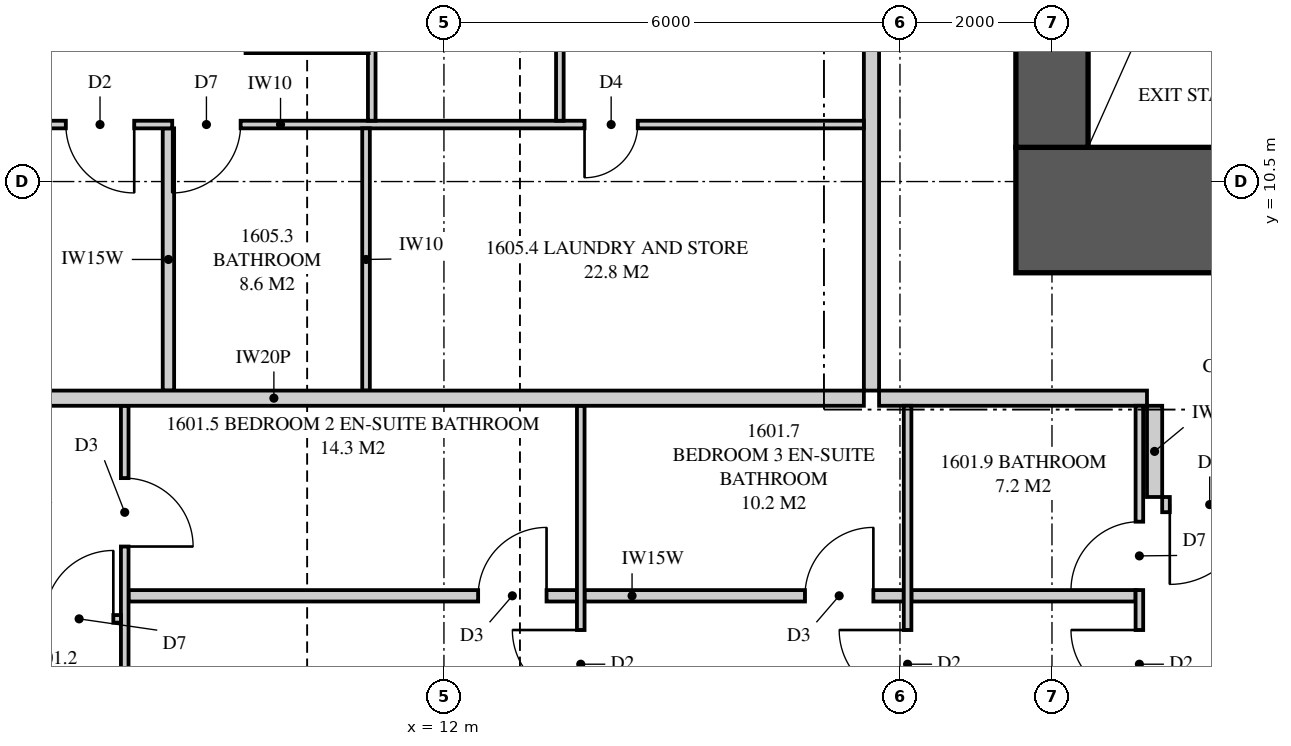
"""IFC4 building model, lengths in metres.
Left out: names, types, materials, properties, quantities, classifications, styles, units other than length and angle.
Written with IfcOpenShell. Run it as: python <this file> out.ifc"""

import sys

from ifc_helpers import new_model, si_unit, direction, frame, frame_2d, origin, place, context, subcontext, project, spatial, polyline, rectangle, outline, extrude, element, fill, save


model = new_model("IFC4")
c1 = context("Model", 3, precision=1e-05, world=origin(), true_north=direction((0.0, 1.0)))
c2 = subcontext(c1, "Body", "Model", "MODEL_VIEW")
j1 = project(units=[si_unit("LENGTHUNIT", "METRE"), si_unit("PLANEANGLEUNIT", "RADIAN")], contexts=[c1])
p1 = place(None, origin())
s1 = spatial("IfcSite", under=j1, at=p1, CompositionType="ELEMENT")
p2 = place(p1, origin())
s2 = spatial("IfcBuilding", under=s1, at=p2, CompositionType="ELEMENT")
p3 = place(p2, frame((0.0, 0.0, 61.2)))
s3 = spatial("IfcBuildingStorey", under=s2, at=p3, CompositionType="ELEMENT", Elevation=61.2)
p4 = place(p3, frame((19.525, 10.125, 0.0), z_axis=(0.0, 0.0, 1.0), x_axis=(1.0, 0.0, 0.0)))
e1 = element("IfcWall", 1, at=p4, inside=s3, PredefinedType="SHEAR", context=c2, shape_type="SweptSolid", body=[
    extrude(rectangle(XDim=6.475, YDim=1.65, at=frame_2d((3.238, 0.0))), origin(), (0.0, 0.0, 1.0), 3.35),
])
p5 = place(p4, frame((4.9, 0.0, 0.0)))
e2 = element("IfcOpeningElement", 2, at=p5, cuts=e1, PredefinedType="OPENING", context=c2, shape_type="SweptSolid", body=[
    extrude(rectangle(XDim=0.75, YDim=2.1, at=frame_2d((0.375, 1.05))), frame((0.0, 0.835, 0.0), z_axis=(0.0, -1.0, 0.0), x_axis=(1.0, 0.0, 0.0)), (0.0, 0.0, 1.0), 1.67),
])
p6 = place(p3, frame((20.0, 13.0, 0.0), z_axis=(0.0, 0.0, 1.0), x_axis=(0.0, -1.0, 0.0)))
e3 = element("IfcWall", 3, at=p6, inside=s3, PredefinedType="SHEAR", context=c2, shape_type="SweptSolid", body=[
    extrude(rectangle(XDim=2.05, YDim=0.95, at=frame_2d((1.025, 0.0))), origin(), (0.0, 0.0, 1.0), 3.35),
])
p7 = place(p3, frame((17.725, 7.65, 0.0), z_axis=(0.0, 0.0, 1.0), x_axis=(1.0, 0.0, 0.0)))
e4 = element("IfcWall", 4, at=p7, inside=s3, PredefinedType="PARTITIONING", context=c2, shape_type="SweptSolid", body=[
    extrude(rectangle(XDim=3.525, YDim=0.2, at=frame_2d((1.762, 0.0))), origin(), (0.0, 0.0, 1.0), 3.11),
])
p8 = place(p3, frame((7.8, 0.175, 0.0), z_axis=(0.0, 0.0, 1.0), x_axis=(0.0, 1.0, 0.0)))
e5 = element("IfcWall", 5, at=p8, inside=s3, PredefinedType="PARTITIONING", context=c2, shape_type="SweptSolid", body=[
    extrude(outline(polyline([(0.0, 0.0), (7.375, 0.0), (7.375, 3.11), (2.697, 3.11), (2.697, 2.15), (0.943, 2.15), (0.943, 3.11), (0.0, 3.11), (0.0, 0.0)])), frame((0.0, 0.05, 0.0), z_axis=(0.0, -1.0, 0.0), x_axis=(1.0, 0.0, 0.0)), (0.0, 0.0, 1.0), 0.1),
])
p9 = place(p8, frame((2.772, 0.0, 0.0)))
e6 = element("IfcOpeningElement", 6, at=p9, cuts=e5, PredefinedType="OPENING", context=c2, shape_type="SweptSolid", body=[
    extrude(rectangle(XDim=0.9, YDim=2.1, at=frame_2d((0.45, 1.05))), frame((0.0, 0.06, 0.0), z_axis=(0.0, -1.0, 0.0), x_axis=(1.0, 0.0, 0.0)), (0.0, 0.0, 1.0), 0.12),
])
p10 = place(p8, frame((5.523, 0.0, 0.0)))
e7 = element("IfcOpeningElement", 7, at=p10, cuts=e5, PredefinedType="OPENING", context=c2, shape_type="SweptSolid", body=[
    extrude(rectangle(XDim=0.9, YDim=2.1, at=frame_2d((0.45, 1.05))), frame((0.0, 0.06, 0.0), z_axis=(0.0, -1.0, 0.0), x_axis=(1.0, 0.0, 0.0)), (0.0, 0.0, 1.0), 0.12),
])
p11 = place(p3, frame((13.8, 0.175, 0.0), z_axis=(0.0, 0.0, 1.0), x_axis=(0.0, 1.0, 0.0)))
e8 = element("IfcWall", 8, at=p11, inside=s3, PredefinedType="PARTITIONING", context=c2, shape_type="SweptSolid", body=[
    extrude(outline(polyline([(1.635, 2.15), (0.0, 2.15), (0.0, 0.0), (7.375, 0.0), (7.375, 3.11), (1.635, 3.11), (1.635, 2.15)]), holes=[polyline([(1.021, 0.133), (0.529, 0.133), (0.529, 0.923), (1.021, 0.923), (1.021, 0.133)]), polyline([(1.021, 1.227), (0.529, 1.227), (0.529, 2.017), (1.021, 2.017), (1.021, 1.227)])]), frame((0.0, 0.05, 0.0), z_axis=(0.0, -1.0, 0.0), x_axis=(1.0, 0.0, 0.0)), (0.0, 0.0, 1.0), 0.1),
])
p12 = place(p11, frame((3.525, 0.0, 0.0)))
e9 = element("IfcOpeningElement", 9, at=p12, cuts=e8, PredefinedType="OPENING", context=c2, shape_type="SweptSolid", body=[
    extrude(rectangle(XDim=0.9, YDim=2.1, at=frame_2d((0.45, 1.05))), frame((0.0, 0.06, 0.0), z_axis=(0.0, -1.0, 0.0), x_axis=(1.0, 0.0, 0.0)), (0.0, 0.0, 1.0), 0.12),
])
p13 = place(p3, frame((18.1, 0.175, 0.0), z_axis=(0.0, 0.0, 1.0), x_axis=(0.0, 1.0, 0.0)))
e10 = element("IfcWall", 10, at=p13, inside=s3, PredefinedType="PARTITIONING", context=c2, shape_type="SweptSolid", body=[
    extrude(outline(polyline([(0.0, 0.0), (7.375, 0.0), (7.375, 3.11), (1.635, 3.11), (1.635, 2.15), (0.0, 2.15), (0.0, 3.11), (0.0, 0.0)])), frame((0.0, 0.05, 0.0), z_axis=(0.0, -1.0, 0.0), x_axis=(1.0, 0.0, 0.0)), (0.0, 0.0, 1.0), 0.1),
])
p14 = place(p13, frame((3.525, 0.0, 0.0)))
e11 = element("IfcOpeningElement", 11, at=p14, cuts=e10, PredefinedType="OPENING", context=c2, shape_type="SweptSolid", body=[
    extrude(rectangle(XDim=0.9, YDim=2.1, at=frame_2d((0.45, 1.05))), frame((0.0, 0.06, 0.0), z_axis=(0.0, -1.0, 0.0), x_axis=(1.0, 0.0, 0.0)), (0.0, 0.0, 1.0), 0.12),
])
p15 = place(p3, frame((21.15, 0.175, 0.0), z_axis=(0.0, 0.0, 1.0), x_axis=(0.0, 1.0, 0.0)))
e12 = element("IfcWall", 12, at=p15, inside=s3, PredefinedType="PARTITIONING", context=c2, shape_type="SweptSolid", body=[
    extrude(outline(polyline([(0.0, 0.0), (7.375, 0.0), (7.375, 3.11), (1.635, 3.11), (1.635, 2.15), (0.0, 2.15), (0.0, 3.11), (0.0, 0.0)])), frame((0.0, 0.05, 0.0), z_axis=(0.0, -1.0, 0.0), x_axis=(1.0, 0.0, 0.0)), (0.0, 0.0, 1.0), 0.1),
])
p16 = place(p15, frame((3.525, 0.0, 0.0)))
e13 = element("IfcOpeningElement", 13, at=p16, cuts=e12, PredefinedType="OPENING", context=c2, shape_type="SweptSolid", body=[
    extrude(rectangle(XDim=0.9, YDim=2.1, at=frame_2d((0.45, 1.05))), frame((0.0, 0.06, 0.0), z_axis=(0.0, -1.0, 0.0), x_axis=(1.0, 0.0, 0.0)), (0.0, 0.0, 1.0), 0.12),
])
p17 = place(p15, frame((4.95, 0.0, 0.0)))
e14 = element("IfcOpeningElement", 14, at=p17, cuts=e12, PredefinedType="OPENING", context=c2, shape_type="SweptSolid", body=[
    extrude(rectangle(XDim=0.9, YDim=2.1, at=frame_2d((0.45, 1.05))), frame((0.0, 0.06, 0.0), z_axis=(0.0, -1.0, 0.0), x_axis=(1.0, 0.0, 0.0)), (0.0, 0.0, 1.0), 0.12),
])
p18 = place(p3, frame((2.0, 4.747, 0.0), z_axis=(0.0, 0.0, 1.0), x_axis=(1.0, 0.0, 0.0)))
e15 = element("IfcWall", 15, at=p18, inside=s3, PredefinedType="PARTITIONING", context=c2, shape_type="SweptSolid", body=[
    extrude(outline(polyline([(0.0, 0.0), (5.75, 0.0), (5.75, 3.11), (3.16, 3.11), (3.16, 2.15), (1.417, 2.15), (1.417, 3.11), (0.0, 3.11), (0.0, 0.0)])), frame((0.0, 0.05, 0.0), z_axis=(0.0, -1.0, 0.0), x_axis=(1.0, 0.0, 0.0)), (0.0, 0.0, 1.0), 0.1),
])
p19 = place(p18, frame((4.75, 0.0, 0.0)))
e16 = element("IfcOpeningElement", 16, at=p19, cuts=e15, PredefinedType="OPENING", context=c2, shape_type="SweptSolid", body=[
    extrude(rectangle(XDim=0.9, YDim=2.1, at=frame_2d((0.45, 1.05))), frame((0.0, 0.06, 0.0), z_axis=(0.0, -1.0, 0.0), x_axis=(1.0, 0.0, 0.0)), (0.0, 0.0, 1.0), 0.12),
])
p20 = place(p3, frame((7.85, 5.05, 0.0), z_axis=(0.0, 0.0, 1.0), x_axis=(1.0, 0.0, 0.0)))
e17 = element("IfcWall", 17, at=p20, inside=s3, PredefinedType="PLUMBINGWALL", context=c2, shape_type="SweptSolid", body=[
    extrude(outline(polyline([(0.0, 0.0), (5.9, 0.0), (5.9, 3.11), (5.462, 3.11), (5.462, 2.541), (4.838, 2.541), (4.838, 3.11), (3.635, 3.11), (3.635, 2.51), (1.065, 2.51), (1.065, 3.11), (0.0, 3.11), (0.0, 0.0)])), frame((0.0, 0.075, 0.0), z_axis=(0.0, -1.0, 0.0), x_axis=(1.0, 0.0, 0.0)), (0.0, 0.0, 1.0), 0.15),
])
p21 = place(p20, frame((4.6, 0.0, 0.0)))
e18 = element("IfcOpeningElement", 18, at=p21, cuts=e17, PredefinedType="OPENING", context=c2, shape_type="SweptSolid", body=[
    extrude(rectangle(XDim=0.9, YDim=2.1, at=frame_2d((0.45, 1.05))), frame((0.0, 0.085, 0.0), z_axis=(0.0, -1.0, 0.0), x_axis=(1.0, 0.0, 0.0)), (0.0, 0.0, 1.0), 0.17),
])
p22 = place(p3, frame((13.85, 5.05, 0.0), z_axis=(0.0, 0.0, 1.0), x_axis=(1.0, 0.0, 0.0)))
e19 = element("IfcWall", 19, at=p22, inside=s3, PredefinedType="PLUMBINGWALL", context=c2, shape_type="SweptSolid", body=[
    extrude(rectangle(XDim=4.2, YDim=0.15, at=frame_2d((2.1, 0.0))), origin(), (0.0, 0.0, 1.0), 3.11),
])
p23 = place(p22, frame((2.9, 0.0, 0.0)))
e20 = element("IfcOpeningElement", 20, at=p23, cuts=e19, PredefinedType="OPENING", context=c2, shape_type="SweptSolid", body=[
    extrude(rectangle(XDim=0.9, YDim=2.1, at=frame_2d((0.45, 1.05))), frame((0.0, 0.085, 0.0), z_axis=(0.0, -1.0, 0.0), x_axis=(1.0, 0.0, 0.0)), (0.0, 0.0, 1.0), 0.17),
])
p24 = place(p3, frame((18.15, 5.05, 0.0), z_axis=(0.0, 0.0, 1.0), x_axis=(1.0, 0.0, 0.0)))
e21 = element("IfcWall", 21, at=p24, inside=s3, PredefinedType="PLUMBINGWALL", context=c2, shape_type="SweptSolid", body=[
    extrude(rectangle(XDim=2.95, YDim=0.15, at=frame_2d((1.475, 0.0))), origin(), (0.0, 0.0, 1.0), 3.11),
])
p25 = place(p3, frame((2.0, 7.65, 0.0), z_axis=(0.0, 0.0, 1.0), x_axis=(1.0, 0.0, 0.0)))
e22 = element("IfcWall", 22, at=p25, inside=s3, PredefinedType="PARTITIONING", context=c2, shape_type="SweptSolid", body=[
    extrude(outline(polyline([(0.0, 0.0), (15.525, 0.0), (15.525, 3.11), (11.337, 3.11), (11.337, 2.541), (10.663, 2.541), (10.663, 3.11), (9.51, 3.11), (9.51, 2.51), (6.89, 2.51), (6.89, 3.11), (2.969, 3.11), (2.969, 2.541), (2.74, 2.541), (2.74, 2.15), (0.896, 2.15), (0.896, 3.11), (0.0, 3.11), (0.0, 0.0)])), frame((0.0, 0.1, 0.0), z_axis=(0.0, -1.0, 0.0), x_axis=(1.0, 0.0, 0.0)), (0.0, 0.0, 1.0), 0.2),
])
p26 = place(p3, frame((17.625, 7.75, 0.0), z_axis=(0.0, 0.0, 1.0), x_axis=(0.0, 1.0, 0.0)))
e23 = element("IfcWall", 23, at=p26, inside=s3, PredefinedType="PARTITIONING", context=c2, shape_type="SweptSolid", body=[
    extrude(outline(polyline([(0.0, 0.0), (16.25, 0.0), (16.25, 3.11), (5.587, 3.11), (5.587, 2.541), (4.913, 2.541), (4.913, 3.11), (0.0, 3.11), (0.0, 0.0)])), frame((0.0, 0.1, 0.0), z_axis=(0.0, -1.0, 0.0), x_axis=(1.0, 0.0, 0.0)), (0.0, 0.0, 1.0), 0.2),
])
p27 = place(p26, frame((7.075, 0.0, 0.0)))
e24 = element("IfcOpeningElement", 24, at=p27, cuts=e23, PredefinedType="OPENING", context=c2, shape_type="SweptSolid", body=[
    extrude(rectangle(XDim=1.05, YDim=2.2, at=frame_2d((0.525, 1.1))), frame((0.0, 0.11, 0.0), z_axis=(0.0, -1.0, 0.0), x_axis=(1.0, 0.0, 0.0)), (0.0, 0.0, 1.0), 0.22),
])
p28 = place(p3, frame((2.175, 11.25, 0.0), z_axis=(0.0, 0.0, 1.0), x_axis=(1.0, 0.0, 0.0)))
e25 = element("IfcWall", 25, at=p28, inside=s3, PredefinedType="PARTITIONING", context=c2, shape_type="SweptSolid", body=[
    extrude(outline(polyline([(0.188, 3.11), (0.0, 3.11), (0.0, 0.0), (0.529, 0.0), (0.529, 0.273), (1.021, 0.273), (1.021, 0.0), (15.35, 0.0), (15.35, 3.11), (11.112, 3.11), (11.112, 2.541), (10.538, 2.541), (10.538, 3.11), (9.285, 3.11), (9.285, 2.51), (6.765, 2.51), (6.765, 3.11), (2.744, 3.11), (2.744, 2.541), (2.169, 2.541), (2.169, 3.11), (1.93, 3.11), (1.93, 2.15), (1.021, 2.15), (1.021, 1.876), (0.529, 1.876), (0.529, 2.15), (0.188, 2.15), (0.188, 3.11)])), frame((0.0, 0.05, 0.0), z_axis=(0.0, -1.0, 0.0), x_axis=(1.0, 0.0, 0.0)), (0.0, 0.0, 1.0), 0.1),
])
p29 = place(p28, frame((4.85, 0.0, 0.0)))
e26 = element("IfcOpeningElement", 26, at=p29, cuts=e25, PredefinedType="OPENING", context=c2, shape_type="SweptSolid", body=[
    extrude(rectangle(XDim=0.9, YDim=2.1, at=frame_2d((0.45, 1.05))), frame((0.0, 0.06, 0.0), z_axis=(0.0, -1.0, 0.0), x_axis=(1.0, 0.0, 0.0)), (0.0, 0.0, 1.0), 0.12),
])
p30 = place(p28, frame((6.25, 0.0, 0.0)))
e27 = element("IfcOpeningElement", 27, at=p30, cuts=e25, PredefinedType="OPENING", context=c2, shape_type="SweptSolid", body=[
    extrude(rectangle(XDim=0.9, YDim=2.1, at=frame_2d((0.45, 1.05))), frame((0.0, 0.06, 0.0), z_axis=(0.0, -1.0, 0.0), x_axis=(1.0, 0.0, 0.0)), (0.0, 0.0, 1.0), 0.12),
])
p31 = place(p28, frame((11.675, 0.0, 0.0)))
e28 = element("IfcOpeningElement", 28, at=p31, cuts=e25, PredefinedType="OPENING", context=c2, shape_type="SweptSolid", body=[
    extrude(rectangle(XDim=0.7, YDim=2.1, at=frame_2d((0.35, 1.05))), frame((0.0, 0.06, 0.0), z_axis=(0.0, -1.0, 0.0), x_axis=(1.0, 0.0, 0.0)), (0.0, 0.0, 1.0), 0.12),
])
p32 = place(p3, frame((8.375, 7.75, 0.0), z_axis=(0.0, 0.0, 1.0), x_axis=(0.0, 1.0, 0.0)))
e29 = element("IfcWall", 29, at=p32, inside=s3, PredefinedType="PLUMBINGWALL", context=c2, shape_type="SweptSolid", body=[
    extrude(rectangle(XDim=3.45, YDim=0.15, at=frame_2d((1.725, 0.0))), origin(), (0.0, 0.0, 1.0), 3.11),
])
p33 = place(p3, frame((10.975, 7.75, 0.0), z_axis=(0.0, 0.0, 1.0), x_axis=(0.0, 1.0, 0.0)))
e30 = element("IfcWall", 30, at=p33, inside=s3, PredefinedType="PARTITIONING", context=c2, shape_type="SweptSolid", body=[
    extrude(outline(polyline([(0.0, 0.0), (3.45, 0.0), (3.45, 3.11), (3.45, 2.51), (0.0, 2.51), (0.0, 3.11), (0.0, 0.0)])), frame((0.0, 0.05, 0.0), z_axis=(0.0, -1.0, 0.0), x_axis=(1.0, 0.0, 0.0)), (0.0, 0.0, 1.0), 0.1),
])
p34 = place(p3, frame((13.525, 11.3, 0.0), z_axis=(0.0, 0.0, 1.0), x_axis=(0.0, 1.0, 0.0)))
e31 = element("IfcWall", 31, at=p34, inside=s3, PredefinedType="PARTITIONING", context=c2, shape_type="SweptSolid", body=[
    extrude(outline(polyline([(0.0, 0.0), (8.05, 0.0), (8.05, 3.11), (1.987, 3.11), (1.987, 2.541), (1.413, 2.541), (1.413, 3.11), (0.0, 3.11), (0.0, 0.0)])), frame((0.0, 0.05, 0.0), z_axis=(0.0, -1.0, 0.0), x_axis=(1.0, 0.0, 0.0)), (0.0, 0.0, 1.0), 0.1),
])
p35 = place(p34, frame((3.525, 0.0, 0.0)))
e32 = element("IfcOpeningElement", 32, at=p35, cuts=e31, PredefinedType="OPENING", context=c2, shape_type="SweptSolid", body=[
    extrude(rectangle(XDim=1.0, YDim=2.1, at=frame_2d((0.5, 1.05))), frame((0.0, 0.06, 0.0), z_axis=(0.0, -1.0, 0.0), x_axis=(1.0, 0.0, 0.0)), (0.0, 0.0, 1.0), 0.12),
])
p36 = place(p3, frame((11.05, 11.3, 0.0), z_axis=(0.0, 0.0, 1.0), x_axis=(0.0, 1.0, 0.0)))
e33 = element("IfcWall", 33, at=p36, inside=s3, PredefinedType="PARTITIONING", context=c2, shape_type="SweptSolid", body=[
    extrude(rectangle(XDim=8.05, YDim=0.1, at=frame_2d((4.025, 0.0))), origin(), (0.0, 0.0, 1.0), 2.51),
])
p37 = place(p36, frame((3.525, 0.0, 0.0)))
e34 = element("IfcOpeningElement", 34, at=p37, cuts=e33, PredefinedType="OPENING", context=c2, shape_type="SweptSolid", body=[
    extrude(rectangle(XDim=1.0, YDim=2.1, at=frame_2d((0.5, 1.05))), frame((0.0, 0.06, 0.0), z_axis=(0.0, -1.0, 0.0), x_axis=(1.0, 0.0, 0.0)), (0.0, 0.0, 1.0), 0.12),
])
p38 = place(p3, frame((21.45, 6.25, 0.0), z_axis=(0.0, 0.0, 1.0), x_axis=(1.0, 0.0, 0.0)))
e35 = element("IfcWall", 35, at=p38, inside=s3, PredefinedType="PARTITIONING", context=c2, shape_type="SweptSolid", body=[
    extrude(outline(polyline([(0.0, 0.0), (2.4, 0.0), (2.4, 3.11), (2.4, 2.541), (2.213, 2.541), (2.213, 3.11), (0.0, 3.11), (0.0, 0.0)])), frame((0.0, 0.1, 0.0), z_axis=(0.0, -1.0, 0.0), x_axis=(1.0, 0.0, 0.0)), (0.0, 0.0, 1.0), 0.2),
])
p39 = place(p38, frame((0.1, 0.0, 0.0)))
e36 = element("IfcOpeningElement", 36, at=p39, cuts=e35, PredefinedType="OPENING", context=c2, shape_type="SweptSolid", body=[
    extrude(rectangle(XDim=1.05, YDim=2.2, at=frame_2d((0.525, 1.1))), frame((0.0, 0.11, 0.0), z_axis=(0.0, -1.0, 0.0), x_axis=(1.0, 0.0, 0.0)), (0.0, 0.0, 1.0), 0.22),
])
p40 = place(p3, frame((21.35, 7.55, 0.0), z_axis=(0.0, 0.0, 1.0), x_axis=(0.0, -1.0, 0.0)))
e37 = element("IfcWall", 37, at=p40, inside=s3, PredefinedType="PARTITIONING", context=c2, shape_type="SweptSolid", body=[
    extrude(rectangle(XDim=1.2, YDim=0.2, at=frame_2d((0.6, 0.0))), origin(), (0.0, 0.0, 1.0), 3.11),
])
p41 = place(p39, frame((1.05, 0.0, 0.0), z_axis=(0.0, 0.0, 1.0), x_axis=(-1.0, 0.0, 0.0)))
e38 = element("IfcDoor", 38, at=p41, inside=s3, OperationType="SINGLE_SWING_RIGHT", PredefinedType="DOOR", context=c2, shape_type="SweptSolid", body=[
    extrude(rectangle(XDim=1.05, YDim=2.2, at=frame_2d((0.525, 1.1))), frame((0.0, 0.025, 0.0), z_axis=(0.0, -1.0, 0.0), x_axis=(1.0, 0.0, 0.0)), (0.0, 0.0, 1.0), 0.05),
])
fill(e36, e38)
p42 = place(p19, origin())
e39 = element("IfcDoor", 39, at=p42, inside=s3, OperationType="SINGLE_SWING_RIGHT", PredefinedType="DOOR", context=c2, shape_type="SweptSolid", body=[
    extrude(rectangle(XDim=0.9, YDim=2.1, at=frame_2d((0.45, 1.05))), frame((0.0, 0.025, 0.0), z_axis=(0.0, -1.0, 0.0), x_axis=(1.0, 0.0, 0.0)), (0.0, 0.0, 1.0), 0.05),
])
fill(e16, e39)
p43 = place(p12, origin())
e40 = element("IfcDoor", 40, at=p43, inside=s3, OperationType="SINGLE_SWING_RIGHT", PredefinedType="DOOR", context=c2, shape_type="SweptSolid", body=[
    extrude(rectangle(XDim=0.9, YDim=2.1, at=frame_2d((0.45, 1.05))), frame((0.0, 0.025, 0.0), z_axis=(0.0, -1.0, 0.0), x_axis=(1.0, 0.0, 0.0)), (0.0, 0.0, 1.0), 0.05),
])
fill(e9, e40)
p44 = place(p21, origin())
e41 = element("IfcDoor", 41, at=p44, inside=s3, OperationType="SINGLE_SWING_RIGHT", PredefinedType="DOOR", context=c2, shape_type="SweptSolid", body=[
    extrude(rectangle(XDim=0.9, YDim=2.1, at=frame_2d((0.45, 1.05))), frame((0.0, 0.025, 0.0), z_axis=(0.0, -1.0, 0.0), x_axis=(1.0, 0.0, 0.0)), (0.0, 0.0, 1.0), 0.05),
])
fill(e18, e41)
p45 = place(p14, origin())
e42 = element("IfcDoor", 42, at=p45, inside=s3, OperationType="SINGLE_SWING_RIGHT", PredefinedType="DOOR", context=c2, shape_type="SweptSolid", body=[
    extrude(rectangle(XDim=0.9, YDim=2.1, at=frame_2d((0.45, 1.05))), frame((0.0, 0.025, 0.0), z_axis=(0.0, -1.0, 0.0), x_axis=(1.0, 0.0, 0.0)), (0.0, 0.0, 1.0), 0.05),
])
fill(e11, e42)
p46 = place(p23, origin())
e43 = element("IfcDoor", 43, at=p46, inside=s3, OperationType="SINGLE_SWING_RIGHT", PredefinedType="DOOR", context=c2, shape_type="SweptSolid", body=[
    extrude(rectangle(XDim=0.9, YDim=2.1, at=frame_2d((0.45, 1.05))), frame((0.0, 0.025, 0.0), z_axis=(0.0, -1.0, 0.0), x_axis=(1.0, 0.0, 0.0)), (0.0, 0.0, 1.0), 0.05),
])
fill(e20, e43)
p47 = place(p16, origin())
e44 = element("IfcDoor", 44, at=p47, inside=s3, OperationType="SINGLE_SWING_RIGHT", PredefinedType="DOOR", context=c2, shape_type="SweptSolid", body=[
    extrude(rectangle(XDim=0.9, YDim=2.1, at=frame_2d((0.45, 1.05))), frame((0.0, 0.025, 0.0), z_axis=(0.0, -1.0, 0.0), x_axis=(1.0, 0.0, 0.0)), (0.0, 0.0, 1.0), 0.05),
])
fill(e13, e44)
p48 = place(p17, origin())
e45 = element("IfcDoor", 45, at=p48, inside=s3, OperationType="SINGLE_SWING_LEFT", PredefinedType="DOOR", context=c2, shape_type="SweptSolid", body=[
    extrude(rectangle(XDim=0.9, YDim=2.1, at=frame_2d((0.45, 1.05))), frame((0.0, 0.025, 0.0), z_axis=(0.0, -1.0, 0.0), x_axis=(1.0, 0.0, 0.0)), (0.0, 0.0, 1.0), 0.05),
])
fill(e14, e45)
p49 = place(p10, frame((0.9, 0.0, 0.0), z_axis=(0.0, 0.0, 1.0), x_axis=(-1.0, 0.0, 0.0)))
e46 = element("IfcDoor", 46, at=p49, inside=s3, OperationType="SINGLE_SWING_RIGHT", PredefinedType="DOOR", context=c2, shape_type="SweptSolid", body=[
    extrude(rectangle(XDim=0.9, YDim=2.1, at=frame_2d((0.45, 1.05))), frame((0.0, 0.025, 0.0), z_axis=(0.0, -1.0, 0.0), x_axis=(1.0, 0.0, 0.0)), (0.0, 0.0, 1.0), 0.05),
])
fill(e7, e46)
p50 = place(p29, frame((0.9, 0.0, 0.0), z_axis=(0.0, 0.0, 1.0), x_axis=(-1.0, 0.0, 0.0)))
e47 = element("IfcDoor", 47, at=p50, inside=s3, OperationType="SINGLE_SWING_LEFT", PredefinedType="DOOR", context=c2, shape_type="SweptSolid", body=[
    extrude(rectangle(XDim=0.9, YDim=2.1, at=frame_2d((0.45, 1.05))), frame((0.0, 0.025, 0.0), z_axis=(0.0, -1.0, 0.0), x_axis=(1.0, 0.0, 0.0)), (0.0, 0.0, 1.0), 0.05),
])
fill(e26, e47)
p51 = place(p30, frame((0.9, 0.0, 0.0), z_axis=(0.0, 0.0, 1.0), x_axis=(-1.0, 0.0, 0.0)))
e48 = element("IfcDoor", 48, at=p51, inside=s3, OperationType="SINGLE_SWING_RIGHT", PredefinedType="DOOR", context=c2, shape_type="SweptSolid", body=[
    extrude(rectangle(XDim=0.9, YDim=2.1, at=frame_2d((0.45, 1.05))), frame((0.0, 0.025, 0.0), z_axis=(0.0, -1.0, 0.0), x_axis=(1.0, 0.0, 0.0)), (0.0, 0.0, 1.0), 0.05),
])
fill(e27, e48)
p52 = place(p31, frame((0.7, 0.0, 0.0), z_axis=(0.0, 0.0, 1.0), x_axis=(-1.0, 0.0, 0.0)))
e49 = element("IfcDoor", 49, at=p52, inside=s3, OperationType="SINGLE_SWING_RIGHT", PredefinedType="DOOR", context=c2, shape_type="SweptSolid", body=[
    extrude(rectangle(XDim=0.7, YDim=2.1, at=frame_2d((0.35, 1.05))), frame((0.0, 0.025, 0.0), z_axis=(0.0, -1.0, 0.0), x_axis=(1.0, 0.0, 0.0)), (0.0, 0.0, 1.0), 0.05),
])
fill(e28, e49)
save(model, sys.argv[1])
